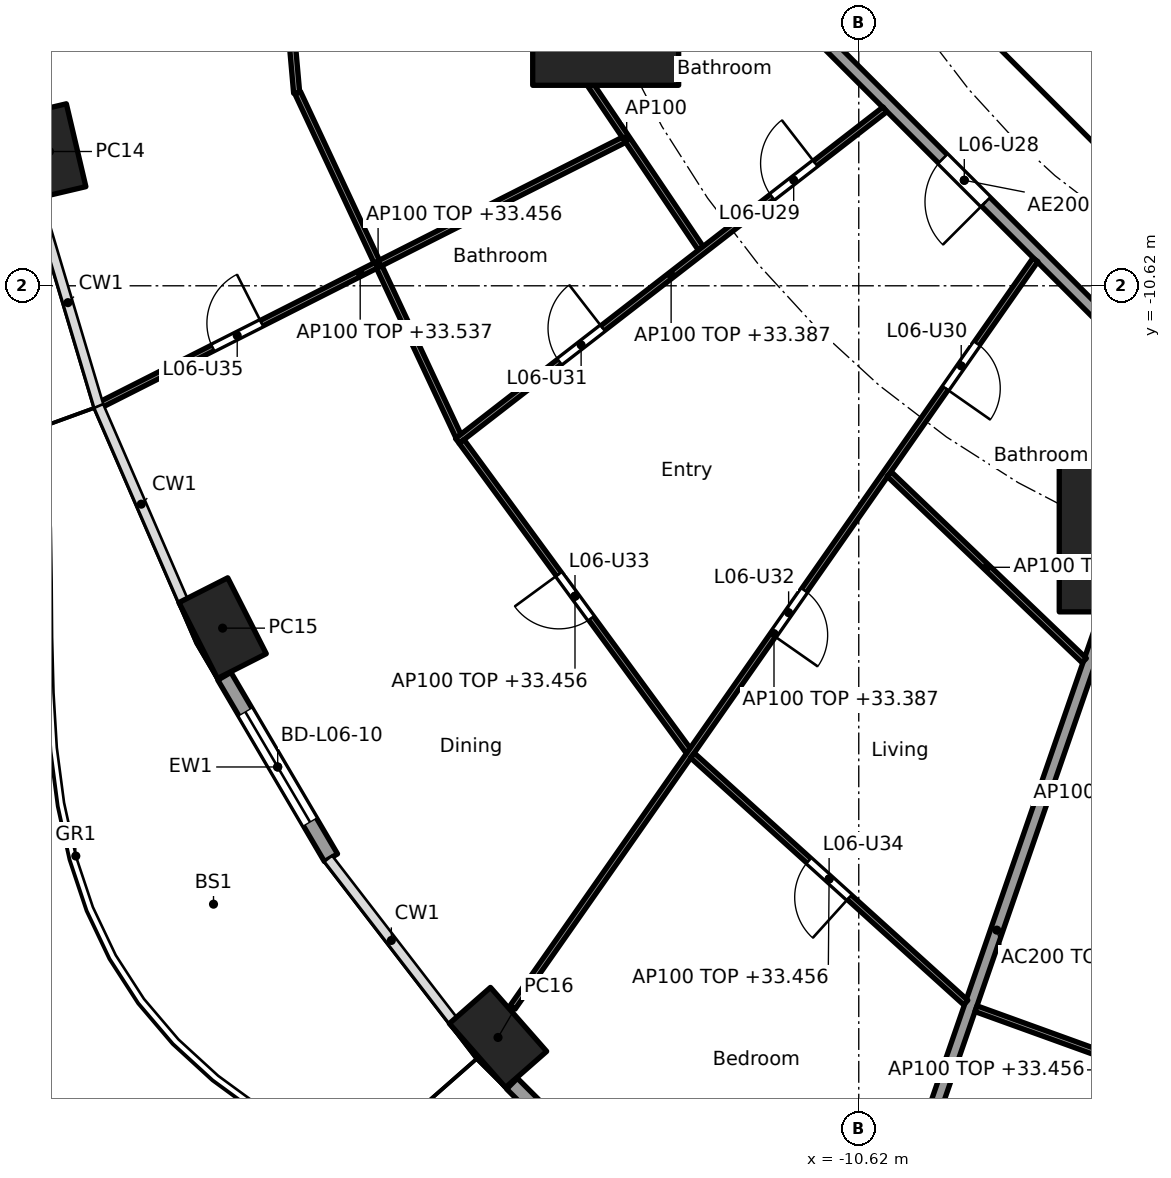
"""IFC4 building model, lengths in metres.
Left out: names, types, materials, properties, quantities, classifications, styles, units other than length and angle.
Written with IfcOpenShell. Run it as: python <this file> out.ifc"""

import sys

from ifc_helpers import new_model, si_unit, direction, frame, frame_2d, origin, origin_2d, place, context, subcontext, project, spatial, rectangle, hollow_rectangle, extrude, element, fill, save


model = new_model("IFC4")
c1 = context("Model", 3, precision=1e-05, world=origin(), true_north=direction((0.0, 1.0)))
c2 = subcontext(c1, "Body", "Model", "MODEL_VIEW")
j1 = project(units=[si_unit("LENGTHUNIT", "METRE"), si_unit("PLANEANGLEUNIT", "RADIAN")], contexts=[c1])
p1 = place(None, origin())
s1 = spatial("IfcSite", under=j1, at=p1, CompositionType="ELEMENT")
p2 = place(p1, origin())
s2 = spatial("IfcBuilding", under=s1, at=p2, CompositionType="ELEMENT")
p3 = place(p2, frame((0.0, 0.0, 30.7)))
s3 = spatial("IfcBuildingStorey", under=s2, at=p3, CompositionType="ELEMENT", Elevation=30.7)
for number, where, z_axis, x_axis in (
    (1, (-23.929, -8.412, 0.0), (0.0, 0.0, 1.0), (0.229, -0.973, 0.0)),
    (2, (-21.082, -16.25, 0.0), (0.0, 0.0, 1.0), (0.452, -0.892, 0.0)),
    (3, (-16.552, -22.981, 0.0), (0.0, 0.0, 1.0), (0.66, -0.751, 0.0)),
):
    element("IfcColumn", number, at=place(p3, frame(where, z_axis=z_axis, x_axis=x_axis)), inside=s3, PredefinedType="COLUMN", context=c2, shape_type="SweptSolid", body=[
        extrude(hollow_rectangle(XDim=1.4, YDim=0.9, WallThickness=0.05, at=origin_2d()), origin(), (0.0, 0.0, 1.0), 3.7),
    ])
for number, where, z_axis, x_axis in (
    (4, (-14.782, -6.123, 0.0), (0.0, 0.0, 1.0), (1.0, 0.0, 0.0)),
    (5, (-6.123, -14.782, 0.0), (0.0, 0.0, 1.0), (1.0, 0.0, 0.0)),
):
    element("IfcColumn", number, at=place(p3, frame(where, z_axis=z_axis, x_axis=x_axis)), inside=s3, PredefinedType="COLUMN", context=c2, shape_type="SweptSolid", body=[
        extrude(rectangle(XDim=2.4, YDim=2.4, at=origin_2d()), origin(), (0.0, 0.0, 1.0), 3.7),
    ])
p4 = place(p3, frame((-19.3, -20.026, 0.0), z_axis=(0.0, 0.0, 1.0), x_axis=(-0.506311160839, 0.862350861546, 0.0)))
e6 = element("IfcWall", 6, at=p4, inside=s3, PredefinedType="SOLIDWALL", context=c2, shape_type="SweptSolid", body=[
    extrude(rectangle(XDim=3.462, YDim=0.25, at=frame_2d((1.731, 0.0))), origin(), (0.0, 0.0, 1.0), 3.44),
])
p5 = place(p4, frame((0.681, 0.0, 0.0)))
e7 = element("IfcOpeningElement", 7, at=p5, cuts=e6, PredefinedType="OPENING", context=c2, shape_type="SweptSolid", body=[
    extrude(rectangle(XDim=2.1, YDim=2.4, at=frame_2d((1.05, 1.2))), frame((0.0, 0.135, 0.0), z_axis=(0.0, -1.0, 0.0), x_axis=(1.0, 0.0, 0.0)), (0.0, 0.0, 1.0), 0.27),
])
p6 = place(p3, frame((-13.966, -26.092, 0.0), z_axis=(0.0, 0.0, 1.0), x_axis=(-0.707803094595, 0.706409781417, 0.0)))
e8 = element("IfcWall", 8, at=p6, inside=s3, PredefinedType="SOLIDWALL", context=c2, shape_type="SweptSolid", body=[
    extrude(rectangle(XDim=3.329, YDim=0.25, at=frame_2d((1.665, 0.0))), origin(), (0.0, 0.0, 1.0), 3.44),
])
p7 = place(p6, frame((0.615, 0.0, 0.0)))
e9 = element("IfcOpeningElement", 9, at=p7, cuts=e8, PredefinedType="OPENING", context=c2, shape_type="SweptSolid", body=[
    extrude(rectangle(XDim=2.1, YDim=2.4, at=frame_2d((1.05, 1.2))), frame((0.0, 0.135, 0.0), z_axis=(0.0, -1.0, 0.0), x_axis=(1.0, 0.0, 0.0)), (0.0, 0.0, 1.0), 0.27),
])
p8 = place(p3, frame((-9.988, -4.613, 0.0), z_axis=(0.0, 0.0, 1.0), x_axis=(0.707106781187, -0.707106781187, 0.0)))
e10 = element("IfcWall", 10, at=p8, inside=s3, PredefinedType="SHEAR", context=c2, shape_type="SweptSolid", body=[
    extrude(rectangle(XDim=7.602, YDim=0.6, at=frame_2d((3.801, 0.0))), origin(), (0.0, 0.0, 1.0), 3.44),
])
p9 = place(p8, frame((6.151, 0.0, 0.0)))
e11 = element("IfcOpeningElement", 11, at=p9, cuts=e10, PredefinedType="OPENING", context=c2, shape_type="SweptSolid", body=[
    extrude(rectangle(XDim=1.1, YDim=2.1, at=frame_2d((0.55, 1.05))), frame((0.0, 0.31, 0.0), z_axis=(0.0, -1.0, 0.0), x_axis=(1.0, 0.0, 0.0)), (0.0, 0.0, 1.0), 0.62),
])
p10 = place(p3, frame((-6.139, -14.829, 0.0), z_axis=(0.0, 0.0, 1.0), x_axis=(-0.327178799566, -0.944962450637, 0.0)))
e12 = element("IfcWall", 12, at=p10, inside=s3, PredefinedType="PARTITIONING", context=c2, shape_type="SweptSolid", body=[
    extrude(rectangle(XDim=13.517, YDim=0.2, at=frame_2d((6.759, 0.0))), origin(), (0.0, 0.0, 1.0), 2.756),
])
p11 = place(p3, frame((-12.635, -5.134, 0.0), z_axis=(0.0, 0.0, 1.0), x_axis=(0.707106781187, -0.707106781187, 0.0)))
e13 = element("IfcWall", 13, at=p11, inside=s3, PredefinedType="PARTITIONING", context=c2, shape_type="SweptSolid", body=[
    extrude(rectangle(XDim=10.609, YDim=0.2, at=frame_2d((5.305, 0.0))), origin(), (0.0, 0.0, 1.0), 3.44),
])
p12 = place(p11, frame((4.804, 0.0, 0.0)))
e14 = element("IfcOpeningElement", 14, at=p12, cuts=e13, PredefinedType="OPENING", context=c2, shape_type="SweptSolid", body=[
    extrude(rectangle(XDim=1.0, YDim=2.1, at=frame_2d((0.5, 1.05))), frame((0.0, 0.11, 0.0), z_axis=(0.0, -1.0, 0.0), x_axis=(1.0, 0.0, 0.0)), (0.0, 0.0, 1.0), 0.22),
])
p13 = place(p3, frame((-20.518, -0.05, 0.0), z_axis=(0.0, 0.0, 1.0), x_axis=(0.088138375539, -0.996108240483, 0.0)))
e15 = element("IfcWall", 15, at=p13, inside=s3, PredefinedType="PARTITIONING", context=c2, shape_type="SweptSolid", body=[
    extrude(rectangle(XDim=7.429, YDim=0.1, at=frame_2d((3.714, 0.0))), origin(), (0.0, 0.0, 1.0), 2.756),
])
p14 = place(p13, frame((3.24, 0.0, 0.0)))
e16 = element("IfcOpeningElement", 16, at=p14, cuts=e15, PredefinedType="OPENING", context=c2, shape_type="SweptSolid", body=[
    extrude(rectangle(XDim=0.9, YDim=2.1, at=frame_2d((0.45, 1.05))), frame((0.0, 0.06, 0.0), z_axis=(0.0, -1.0, 0.0), x_axis=(1.0, 0.0, 0.0)), (0.0, 0.0, 1.0), 0.12),
])
p15 = place(p3, frame((-15.655, -6.391, 0.0), z_axis=(0.0, 0.0, 1.0), x_axis=(0.559126445155, -0.82908239538, 0.0)))
e17 = element("IfcWall", 17, at=p15, inside=s3, PredefinedType="PARTITIONING", context=c2, shape_type="SweptSolid", body=[
    extrude(rectangle(XDim=4.358, YDim=0.1, at=frame_2d((2.179, 0.0))), origin(), (0.0, 0.0, 1.0), 3.44),
])
p16 = place(p3, frame((-19.847, -7.445, 0.0), z_axis=(0.0, 0.0, 1.0), x_axis=(0.423892287987, -0.905712607942, 0.0)))
e18 = element("IfcWall", 18, at=p16, inside=s3, PredefinedType="PARTITIONING", context=c2, shape_type="SweptSolid", body=[
    extrude(rectangle(XDim=6.238, YDim=0.1, at=frame_2d((3.119, 0.0))), origin(), (0.0, 0.0, 1.0), 2.756),
])
p17 = place(p3, frame((-14.481, -8.22, 0.0), z_axis=(0.0, 0.0, 1.0), x_axis=(-0.892232077638, -0.451577146935, 0.0)))
e19 = element("IfcWall", 19, at=p17, inside=s3, PredefinedType="PARTITIONING", context=c2, shape_type="SweptSolid", body=[
    extrude(rectangle(XDim=9.723, YDim=0.1, at=frame_2d((4.862, 0.0))), origin(), (0.0, 0.0, 1.0), 2.837),
])
p18 = place(p17, frame((6.678, 0.0, 0.0)))
e20 = element("IfcOpeningElement", 20, at=p18, cuts=e19, PredefinedType="OPENING", context=c2, shape_type="SweptSolid", body=[
    extrude(rectangle(XDim=0.9, YDim=2.1, at=frame_2d((0.45, 1.05))), frame((0.0, 0.06, 0.0), z_axis=(0.0, -1.0, 0.0), x_axis=(1.0, 0.0, 0.0)), (0.0, 0.0, 1.0), 0.12),
])
p19 = place(p3, frame((-10.19, -7.719, 0.0), z_axis=(0.0, 0.0, 1.0), x_axis=(-0.790264549439, -0.612765813259, 0.0)))
e21 = element("IfcWall", 21, at=p19, inside=s3, PredefinedType="PARTITIONING", context=c2, shape_type="SweptSolid", body=[
    extrude(rectangle(XDim=8.896, YDim=0.1, at=frame_2d((4.448, 0.0))), origin(), (0.0, 0.0, 1.0), 2.687),
])
p20 = place(p19, frame((1.448, 0.0, 0.0)))
e22 = element("IfcOpeningElement", 22, at=p20, cuts=e21, PredefinedType="OPENING", context=c2, shape_type="SweptSolid", body=[
    extrude(rectangle(XDim=0.9, YDim=2.1, at=frame_2d((0.45, 1.05))), frame((0.0, 0.06, 0.0), z_axis=(0.0, -1.0, 0.0), x_axis=(1.0, 0.0, 0.0)), (0.0, 0.0, 1.0), 0.12),
])
p21 = place(p19, frame((5.871, 0.0, 0.0)))
e23 = element("IfcOpeningElement", 23, at=p21, cuts=e21, PredefinedType="OPENING", context=c2, shape_type="SweptSolid", body=[
    extrude(rectangle(XDim=0.9, YDim=2.1, at=frame_2d((0.45, 1.05))), frame((0.0, 0.06, 0.0), z_axis=(0.0, -1.0, 0.0), x_axis=(1.0, 0.0, 0.0)), (0.0, 0.0, 1.0), 0.12),
])
p22 = place(p3, frame((-17.152, -13.18, 0.0), z_axis=(0.0, 0.0, 1.0), x_axis=(0.591222750954, -0.806508312886, 0.0)))
e24 = element("IfcWall", 24, at=p22, inside=s3, PredefinedType="PARTITIONING", context=c2, shape_type="SweptSolid", body=[
    extrude(rectangle(XDim=6.31, YDim=0.1, at=frame_2d((3.155, 0.0))), origin(), (0.0, 0.0, 1.0), 2.756),
])
p23 = place(p22, frame((2.705, 0.0, 0.0)))
e25 = element("IfcOpeningElement", 25, at=p23, cuts=e24, PredefinedType="OPENING", context=c2, shape_type="SweptSolid", body=[
    extrude(rectangle(XDim=0.9, YDim=2.1, at=frame_2d((0.45, 1.05))), frame((0.0, 0.06, 0.0), z_axis=(0.0, -1.0, 0.0), x_axis=(1.0, 0.0, 0.0)), (0.0, 0.0, 1.0), 0.12),
])
p24 = place(p3, frame((-7.715, -10.193, 0.0), z_axis=(0.0, 0.0, 1.0), x_axis=(-0.573126964124, -0.819466584428, 0.0)))
e26 = element("IfcWall", 26, at=p24, inside=s3, PredefinedType="PARTITIONING", context=c2, shape_type="SweptSolid", body=[
    extrude(rectangle(XDim=15.001, YDim=0.1, at=frame_2d((7.5, 0.0))), origin(), (0.0, 0.0, 1.0), 2.687),
])
p25 = place(p24, frame((1.678, 0.0, 0.0)))
e27 = element("IfcOpeningElement", 27, at=p25, cuts=e26, PredefinedType="OPENING", context=c2, shape_type="SweptSolid", body=[
    extrude(rectangle(XDim=0.9, YDim=2.1, at=frame_2d((0.45, 1.05))), frame((0.0, 0.06, 0.0), z_axis=(0.0, -1.0, 0.0), x_axis=(1.0, 0.0, 0.0)), (0.0, 0.0, 1.0), 0.12),
])
p26 = place(p24, frame((6.631, 0.0, 0.0)))
e28 = element("IfcOpeningElement", 28, at=p26, cuts=e26, PredefinedType="OPENING", context=c2, shape_type="SweptSolid", body=[
    extrude(rectangle(XDim=0.9, YDim=2.1, at=frame_2d((0.45, 1.05))), frame((0.0, 0.06, 0.0), z_axis=(0.0, -1.0, 0.0), x_axis=(1.0, 0.0, 0.0)), (0.0, 0.0, 1.0), 0.12),
])
p27 = place(p3, frame((-10.119, -13.716, 0.0), z_axis=(0.0, 0.0, 1.0), x_axis=(0.722775679202, -0.691082713975, 0.0)))
e29 = element("IfcWall", 29, at=p27, inside=s3, PredefinedType="PARTITIONING", context=c2, shape_type="SweptSolid", body=[
    extrude(rectangle(XDim=4.437, YDim=0.1, at=frame_2d((2.219, 0.0))), origin(), (0.0, 0.0, 1.0), 2.756),
])
p28 = place(p3, frame((-13.355, -18.343, 0.0), z_axis=(0.0, 0.0, 1.0), x_axis=(0.741713303551, -0.670717060567, 0.0)))
e30 = element("IfcWall", 30, at=p28, inside=s3, PredefinedType="PARTITIONING", context=c2, shape_type="SweptSolid", body=[
    extrude(rectangle(XDim=6.059, YDim=0.1, at=frame_2d((3.03, 0.0))), origin(), (0.0, 0.0, 1.0), 2.756),
])
p29 = place(p28, frame((2.58, 0.0, 0.0)))
e31 = element("IfcOpeningElement", 31, at=p29, cuts=e30, PredefinedType="OPENING", context=c2, shape_type="SweptSolid", body=[
    extrude(rectangle(XDim=0.9, YDim=2.1, at=frame_2d((0.45, 1.05))), frame((0.0, 0.06, 0.0), z_axis=(0.0, -1.0, 0.0), x_axis=(1.0, 0.0, 0.0)), (0.0, 0.0, 1.0), 0.12),
])
p30 = place(p3, frame((-8.692, -22.508, 0.0), z_axis=(0.0, 0.0, 1.0), x_axis=(0.940401494588, -0.340066212636, 0.0)))
e32 = element("IfcWall", 32, at=p30, inside=s3, PredefinedType="PARTITIONING", context=c2, shape_type="SweptSolid", body=[
    extrude(rectangle(XDim=5.917, YDim=0.1, at=frame_2d((2.958, 0.0))), origin(), (0.0, 0.0, 1.0), 2.756),
])
p31 = place(p30, frame((2.509, 0.0, 0.0)))
e33 = element("IfcOpeningElement", 33, at=p31, cuts=e32, PredefinedType="OPENING", context=c2, shape_type="SweptSolid", body=[
    extrude(rectangle(XDim=0.9, YDim=2.1, at=frame_2d((0.45, 1.05))), frame((0.0, 0.06, 0.0), z_axis=(0.0, -1.0, 0.0), x_axis=(1.0, 0.0, 0.0)), (0.0, 0.0, 1.0), 0.12),
])
p32 = place(p5, origin())
e34 = element("IfcDoor", 34, at=p32, inside=s3, OperationType="SLIDING_TO_LEFT", PredefinedType="DOOR", context=c2, shape_type="SweptSolid", body=[
    extrude(rectangle(XDim=2.1, YDim=2.4, at=frame_2d((1.05, 1.2))), frame((0.0, 0.025, 0.0), z_axis=(0.0, -1.0, 0.0), x_axis=(1.0, 0.0, 0.0)), (0.0, 0.0, 1.0), 0.05),
])
fill(e7, e34)
p33 = place(p12, frame((1.0, 0.0, 0.0), x_axis=(-1.0, 0.0, 0.0)))
e35 = element("IfcDoor", 35, at=p33, inside=s3, OperationType="SINGLE_SWING_LEFT", PredefinedType="DOOR", context=c2, shape_type="SweptSolid", body=[
    extrude(rectangle(XDim=1.0, YDim=2.1, at=frame_2d((0.5, 1.05))), frame((0.0, 0.025, 0.0), z_axis=(0.0, -1.0, 0.0), x_axis=(1.0, 0.0, 0.0)), (0.0, 0.0, 1.0), 0.05),
])
fill(e14, e35)
p34 = place(p20, frame((0.9, 0.0, 0.0), x_axis=(-1.0, 0.0, 0.0)))
e36 = element("IfcDoor", 36, at=p34, inside=s3, OperationType="SINGLE_SWING_RIGHT", PredefinedType="DOOR", context=c2, shape_type="SweptSolid", body=[
    extrude(rectangle(XDim=0.9, YDim=2.1, at=frame_2d((0.45, 1.05))), frame((0.0, 0.025, 0.0), z_axis=(0.0, -1.0, 0.0), x_axis=(1.0, 0.0, 0.0)), (0.0, 0.0, 1.0), 0.05),
])
fill(e22, e36)
p35 = place(p25, origin())
e37 = element("IfcDoor", 37, at=p35, inside=s3, OperationType="SINGLE_SWING_RIGHT", PredefinedType="DOOR", context=c2, shape_type="SweptSolid", body=[
    extrude(rectangle(XDim=0.9, YDim=2.1, at=frame_2d((0.45, 1.05))), frame((0.0, 0.025, 0.0), z_axis=(0.0, -1.0, 0.0), x_axis=(1.0, 0.0, 0.0)), (0.0, 0.0, 1.0), 0.05),
])
fill(e27, e37)
p36 = place(p21, frame((0.9, 0.0, 0.0), x_axis=(-1.0, 0.0, 0.0)))
e38 = element("IfcDoor", 38, at=p36, inside=s3, OperationType="SINGLE_SWING_RIGHT", PredefinedType="DOOR", context=c2, shape_type="SweptSolid", body=[
    extrude(rectangle(XDim=0.9, YDim=2.1, at=frame_2d((0.45, 1.05))), frame((0.0, 0.025, 0.0), z_axis=(0.0, -1.0, 0.0), x_axis=(1.0, 0.0, 0.0)), (0.0, 0.0, 1.0), 0.05),
])
fill(e23, e38)
p37 = place(p26, origin())
e39 = element("IfcDoor", 39, at=p37, inside=s3, OperationType="SINGLE_SWING_RIGHT", PredefinedType="DOOR", context=c2, shape_type="SweptSolid", body=[
    extrude(rectangle(XDim=0.9, YDim=2.1, at=frame_2d((0.45, 1.05))), frame((0.0, 0.025, 0.0), z_axis=(0.0, -1.0, 0.0), x_axis=(1.0, 0.0, 0.0)), (0.0, 0.0, 1.0), 0.05),
])
fill(e28, e39)
p38 = place(p23, frame((0.9, 0.0, 0.0), x_axis=(-1.0, 0.0, 0.0)))
e40 = element("IfcDoor", 40, at=p38, inside=s3, OperationType="SINGLE_SWING_RIGHT", PredefinedType="DOOR", context=c2, shape_type="SweptSolid", body=[
    extrude(rectangle(XDim=0.9, YDim=2.1, at=frame_2d((0.45, 1.05))), frame((0.0, 0.025, 0.0), z_axis=(0.0, -1.0, 0.0), x_axis=(1.0, 0.0, 0.0)), (0.0, 0.0, 1.0), 0.05),
])
fill(e25, e40)
p39 = place(p29, frame((0.9, 0.0, 0.0), x_axis=(-1.0, 0.0, 0.0)))
e41 = element("IfcDoor", 41, at=p39, inside=s3, OperationType="SINGLE_SWING_LEFT", PredefinedType="DOOR", context=c2, shape_type="SweptSolid", body=[
    extrude(rectangle(XDim=0.9, YDim=2.1, at=frame_2d((0.45, 1.05))), frame((0.0, 0.025, 0.0), z_axis=(0.0, -1.0, 0.0), x_axis=(1.0, 0.0, 0.0)), (0.0, 0.0, 1.0), 0.05),
])
fill(e31, e41)
p40 = place(p18, frame((0.9, 0.0, 0.0), x_axis=(-1.0, 0.0, 0.0)))
e42 = element("IfcDoor", 42, at=p40, inside=s3, OperationType="SINGLE_SWING_RIGHT", PredefinedType="DOOR", context=c2, shape_type="SweptSolid", body=[
    extrude(rectangle(XDim=0.9, YDim=2.1, at=frame_2d((0.45, 1.05))), frame((0.0, 0.025, 0.0), z_axis=(0.0, -1.0, 0.0), x_axis=(1.0, 0.0, 0.0)), (0.0, 0.0, 1.0), 0.05),
])
fill(e20, e42)
save(model, sys.argv[1])
